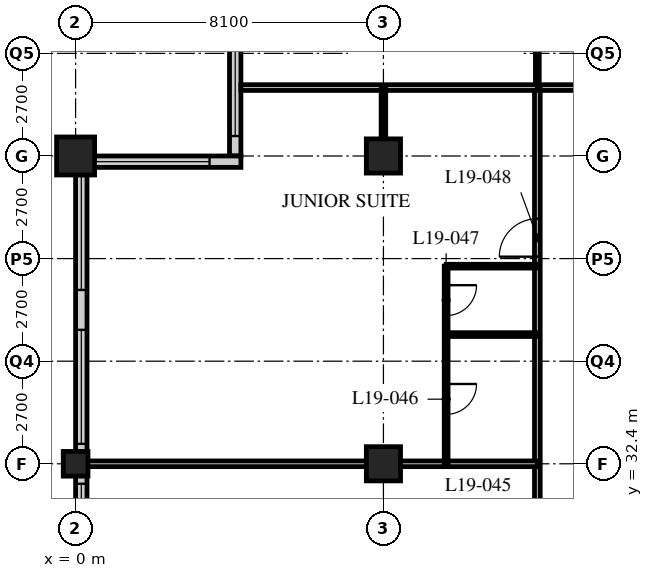
"""IFC4 building model, lengths in metres.
Left out: names, types, materials, properties, quantities, classifications, styles, units other than length and angle.
Written with IfcOpenShell. Run it as: python <this file> out.ifc"""

import sys

from ifc_helpers import new_model, si_unit, direction, frame, frame_2d, origin, origin_2d, place, context, subcontext, project, spatial, rectangle, hollow_rectangle, extrude, element, fill, save


model = new_model("IFC4")
c1 = context("Model", 3, precision=1e-05, world=origin(), true_north=direction((0.0, 1.0)))
c2 = subcontext(c1, "Body", "Model", "MODEL_VIEW")
j1 = project(units=[si_unit("LENGTHUNIT", "METRE"), si_unit("PLANEANGLEUNIT", "RADIAN")], contexts=[c1])
p1 = place(None, origin())
s1 = spatial("IfcSite", under=j1, at=p1, CompositionType="ELEMENT")
p2 = place(p1, origin())
s2 = spatial("IfcBuilding", under=s1, at=p2, CompositionType="ELEMENT")
p3 = place(p2, frame((0.0, 0.0, 77.2)))
s3 = spatial("IfcBuildingStorey", under=s2, at=p3, CompositionType="ELEMENT", Elevation=77.2)
p4 = place(p3, frame((0.0, 32.4, 0.0), z_axis=(0.0, 0.0, 1.0), x_axis=(1.0, 0.0, 0.0)))
e1 = element("IfcColumn", 1, at=p4, inside=s3, PredefinedType="COLUMN", context=c2, shape_type="SweptSolid", body=[
    extrude(hollow_rectangle(XDim=0.65, YDim=0.65, WallThickness=0.05, at=origin_2d()), origin(), (0.0, 0.0, 1.0), 3.4),
])
p5 = place(p3, frame((0.0, 40.5, 0.0), z_axis=(0.0, 0.0, 1.0), x_axis=(1.0, 0.0, 0.0)))
e2 = element("IfcColumn", 2, at=p5, inside=s3, PredefinedType="COLUMN", context=c2, shape_type="SweptSolid", body=[
    extrude(hollow_rectangle(XDim=1.0, YDim=1.0, WallThickness=0.1, at=origin_2d()), origin(), (0.0, 0.0, 1.0), 3.4),
])
for number, where, z_axis, x_axis in (
    (3, (8.1, 32.4, 0.0), (0.0, 0.0, 1.0), (1.0, 0.0, 0.0)),
    (4, (8.1, 40.5, 0.0), (0.0, 0.0, 1.0), (1.0, 0.0, 0.0)),
):
    element("IfcColumn", number, at=place(p3, frame(where, z_axis=z_axis, x_axis=x_axis)), inside=s3, PredefinedType="COLUMN", context=c2, shape_type="SweptSolid", body=[
        extrude(hollow_rectangle(XDim=0.9, YDim=0.9, WallThickness=0.09, at=origin_2d()), origin(), (0.0, 0.0, 1.0), 3.4),
    ])
p6 = place(p3, frame((4.2, 44.25, 0.0), z_axis=(0.0, 0.0, 1.0), x_axis=(0.0, -1.0, 0.0)))
e5 = element("IfcWall", 5, at=p6, inside=s3, PredefinedType="SOLIDWALL", context=c2, shape_type="SweptSolid", body=[
    extrude(rectangle(XDim=3.75, YDim=0.3, at=frame_2d((1.875, 0.0))), origin(), (0.0, 0.0, 1.0), 3.19),
])
p7 = place(p6, frame((0.225, 0.0, 0.9)))
e6 = element("IfcOpeningElement", 6, at=p7, cuts=e5, PredefinedType="OPENING", context=c2, shape_type="SweptSolid", body=[
    extrude(rectangle(XDim=3.0, YDim=1.5, at=frame_2d((1.5, 0.75))), frame((0.0, 0.16, 0.0), z_axis=(0.0, -1.0, 0.0), x_axis=(1.0, 0.0, 0.0)), (0.0, 0.0, 1.0), 0.32),
])
p8 = place(p3, frame((4.35, 40.35, 0.0), z_axis=(0.0, 0.0, 1.0), x_axis=(-1.0, 0.0, 0.0)))
e7 = element("IfcWall", 7, at=p8, inside=s3, PredefinedType="SOLIDWALL", context=c2, shape_type="SweptSolid", body=[
    extrude(rectangle(XDim=4.35, YDim=0.3, at=frame_2d((2.175, 0.0))), origin(), (0.0, 0.0, 1.0), 3.19),
])
p9 = place(p8, frame((0.825, 0.0, 0.9)))
e8 = element("IfcOpeningElement", 8, at=p9, cuts=e7, PredefinedType="OPENING", context=c2, shape_type="SweptSolid", body=[
    extrude(rectangle(XDim=3.0, YDim=1.5, at=frame_2d((1.5, 0.75))), frame((0.0, 0.16, 0.0), z_axis=(0.0, -1.0, 0.0), x_axis=(1.0, 0.0, 0.0)), (0.0, 0.0, 1.0), 0.32),
])
p10 = place(p3, frame((0.15, 40.2, 0.0), z_axis=(0.0, 0.0, 1.0), x_axis=(0.0, -1.0, 0.0)))
e9 = element("IfcWall", 9, at=p10, inside=s3, PredefinedType="SOLIDWALL", context=c2, shape_type="SweptSolid", body=[
    extrude(rectangle(XDim=32.1, YDim=0.3, at=frame_2d((16.05, 0.0))), origin(), (0.0, 0.0, 1.0), 3.19),
])
p11 = place(p10, frame((0.225, 0.0, 0.9)))
e10 = element("IfcOpeningElement", 10, at=p11, cuts=e9, PredefinedType="OPENING", context=c2, shape_type="SweptSolid", body=[
    extrude(rectangle(XDim=3.0, YDim=1.5, at=frame_2d((1.5, 0.75))), frame((0.0, 0.16, 0.0), z_axis=(0.0, -1.0, 0.0), x_axis=(1.0, 0.0, 0.0)), (0.0, 0.0, 1.0), 0.32),
])
p12 = place(p10, frame((4.275, 0.0, 0.9)))
e11 = element("IfcOpeningElement", 11, at=p12, cuts=e9, PredefinedType="OPENING", context=c2, shape_type="SweptSolid", body=[
    extrude(rectangle(XDim=3.0, YDim=1.5, at=frame_2d((1.5, 0.75))), frame((0.0, 0.16, 0.0), z_axis=(0.0, -1.0, 0.0), x_axis=(1.0, 0.0, 0.0)), (0.0, 0.0, 1.0), 0.32),
])
p13 = place(p10, frame((8.325, 0.0, 0.9)))
e12 = element("IfcOpeningElement", 12, at=p13, cuts=e9, PredefinedType="OPENING", context=c2, shape_type="SweptSolid", body=[
    extrude(rectangle(XDim=3.0, YDim=1.5, at=frame_2d((1.5, 0.75))), frame((0.0, 0.16, 0.0), z_axis=(0.0, -1.0, 0.0), x_axis=(1.0, 0.0, 0.0)), (0.0, 0.0, 1.0), 0.32),
])
p14 = place(p10, frame((12.375, 0.0, 0.9)))
e13 = element("IfcOpeningElement", 13, at=p14, cuts=e9, PredefinedType="OPENING", context=c2, shape_type="SweptSolid", body=[
    extrude(rectangle(XDim=3.0, YDim=1.5, at=frame_2d((1.5, 0.75))), frame((0.0, 0.16, 0.0), z_axis=(0.0, -1.0, 0.0), x_axis=(1.0, 0.0, 0.0)), (0.0, 0.0, 1.0), 0.32),
])
p15 = place(p10, frame((16.425, 0.0, 0.9)))
e14 = element("IfcOpeningElement", 14, at=p15, cuts=e9, PredefinedType="OPENING", context=c2, shape_type="SweptSolid", body=[
    extrude(rectangle(XDim=3.0, YDim=1.5, at=frame_2d((1.5, 0.75))), frame((0.0, 0.16, 0.0), z_axis=(0.0, -1.0, 0.0), x_axis=(1.0, 0.0, 0.0)), (0.0, 0.0, 1.0), 0.32),
])
p16 = place(p10, frame((20.475, 0.0, 0.9)))
e15 = element("IfcOpeningElement", 15, at=p16, cuts=e9, PredefinedType="OPENING", context=c2, shape_type="SweptSolid", body=[
    extrude(rectangle(XDim=3.0, YDim=1.5, at=frame_2d((1.5, 0.75))), frame((0.0, 0.16, 0.0), z_axis=(0.0, -1.0, 0.0), x_axis=(1.0, 0.0, 0.0)), (0.0, 0.0, 1.0), 0.32),
])
p17 = place(p10, frame((24.525, 0.0, 0.9)))
e16 = element("IfcOpeningElement", 16, at=p17, cuts=e9, PredefinedType="OPENING", context=c2, shape_type="SweptSolid", body=[
    extrude(rectangle(XDim=3.0, YDim=1.5, at=frame_2d((1.5, 0.75))), frame((0.0, 0.16, 0.0), z_axis=(0.0, -1.0, 0.0), x_axis=(1.0, 0.0, 0.0)), (0.0, 0.0, 1.0), 0.32),
])
p18 = place(p10, frame((28.575, 0.0, 0.9)))
e17 = element("IfcOpeningElement", 17, at=p18, cuts=e9, PredefinedType="OPENING", context=c2, shape_type="SweptSolid", body=[
    extrude(rectangle(XDim=3.0, YDim=1.5, at=frame_2d((1.5, 0.75))), frame((0.0, 0.16, 0.0), z_axis=(0.0, -1.0, 0.0), x_axis=(1.0, 0.0, 0.0)), (0.0, 0.0, 1.0), 0.32),
])
p19 = place(p3, frame((12.15, 42.3, 0.0), z_axis=(0.0, 0.0, 1.0), x_axis=(1.0, 0.0, 0.0)))
e18 = element("IfcWall", 18, at=p19, inside=s3, PredefinedType="PARTITIONING", context=c2, shape_type="SweptSolid", body=[
    extrude(rectangle(XDim=36.45, YDim=0.15, at=frame_2d((18.225, 0.0))), origin(), (0.0, 0.0, 1.0), 3.19),
])
p20 = place(p19, frame((9.5, 0.0, 0.0)))
e19 = element("IfcOpeningElement", 19, at=p20, cuts=e18, PredefinedType="OPENING", context=c2, shape_type="SweptSolid", body=[
    extrude(rectangle(XDim=1.0, YDim=2.1, at=frame_2d((0.5, 1.05))), frame((0.0, 0.085, 0.0), z_axis=(0.0, -1.0, 0.0), x_axis=(1.0, 0.0, 0.0)), (0.0, 0.0, 1.0), 0.17),
])
p21 = place(p19, frame((17.6, 0.0, 0.0)))
e20 = element("IfcOpeningElement", 20, at=p21, cuts=e18, PredefinedType="OPENING", context=c2, shape_type="SweptSolid", body=[
    extrude(rectangle(XDim=1.0, YDim=2.1, at=frame_2d((0.5, 1.05))), frame((0.0, 0.085, 0.0), z_axis=(0.0, -1.0, 0.0), x_axis=(1.0, 0.0, 0.0)), (0.0, 0.0, 1.0), 0.17),
])
p22 = place(p19, frame((22.7, 0.0, 0.0)))
e21 = element("IfcOpeningElement", 21, at=p22, cuts=e18, PredefinedType="OPENING", context=c2, shape_type="SweptSolid", body=[
    extrude(rectangle(XDim=1.0, YDim=2.1, at=frame_2d((0.5, 1.05))), frame((0.0, 0.085, 0.0), z_axis=(0.0, -1.0, 0.0), x_axis=(1.0, 0.0, 0.0)), (0.0, 0.0, 1.0), 0.17),
])
p23 = place(p19, frame((26.75, 0.0, 0.0)))
e22 = element("IfcOpeningElement", 22, at=p23, cuts=e18, PredefinedType="OPENING", context=c2, shape_type="SweptSolid", body=[
    extrude(rectangle(XDim=1.0, YDim=2.1, at=frame_2d((0.5, 1.05))), frame((0.0, 0.085, 0.0), z_axis=(0.0, -1.0, 0.0), x_axis=(1.0, 0.0, 0.0)), (0.0, 0.0, 1.0), 0.17),
])
p24 = place(p19, frame((30.8, 0.0, 0.0)))
e23 = element("IfcOpeningElement", 23, at=p24, cuts=e18, PredefinedType="OPENING", context=c2, shape_type="SweptSolid", body=[
    extrude(rectangle(XDim=1.0, YDim=2.1, at=frame_2d((0.5, 1.05))), frame((0.0, 0.085, 0.0), z_axis=(0.0, -1.0, 0.0), x_axis=(1.0, 0.0, 0.0)), (0.0, 0.0, 1.0), 0.17),
])
p25 = place(p19, frame((32.825, 0.0, 0.0)))
e24 = element("IfcOpeningElement", 24, at=p25, cuts=e18, PredefinedType="OPENING", context=c2, shape_type="SweptSolid", body=[
    extrude(rectangle(XDim=1.0, YDim=2.1, at=frame_2d((0.5, 1.05))), frame((0.0, 0.085, 0.0), z_axis=(0.0, -1.0, 0.0), x_axis=(1.0, 0.0, 0.0)), (0.0, 0.0, 1.0), 0.17),
])
p26 = place(p19, frame((2.625, 0.0, 0.0)))
e25 = element("IfcOpeningElement", 25, at=p26, cuts=e18, PredefinedType="OPENING", context=c2, shape_type="SweptSolid", body=[
    extrude(rectangle(XDim=1.0, YDim=2.1, at=frame_2d((0.5, 1.05))), frame((0.0, 0.085, 0.0), z_axis=(0.0, -1.0, 0.0), x_axis=(1.0, 0.0, 0.0)), (0.0, 0.0, 1.0), 0.17),
])
p27 = place(p3, frame((12.15, 16.2, 0.0), z_axis=(0.0, 0.0, 1.0), x_axis=(0.0, 1.0, 0.0)))
e26 = element("IfcWall", 26, at=p27, inside=s3, PredefinedType="PARTITIONING", context=c2, shape_type="SweptSolid", body=[
    extrude(rectangle(XDim=26.1, YDim=0.15, at=frame_2d((13.05, 0.0))), origin(), (0.0, 0.0, 1.0), 3.19),
])
p28 = place(p27, frame((0.3, 0.0, 0.0)))
e27 = element("IfcOpeningElement", 27, at=p28, cuts=e26, PredefinedType="OPENING", context=c2, shape_type="SweptSolid", body=[
    extrude(rectangle(XDim=1.0, YDim=2.1, at=frame_2d((0.5, 1.05))), frame((0.0, 0.085, 0.0), z_axis=(0.0, -1.0, 0.0), x_axis=(1.0, 0.0, 0.0)), (0.0, 0.0, 1.0), 0.17),
])
p29 = place(p27, frame((6.5, 0.0, 0.0)))
e28 = element("IfcOpeningElement", 28, at=p29, cuts=e26, PredefinedType="OPENING", context=c2, shape_type="SweptSolid", body=[
    extrude(rectangle(XDim=1.0, YDim=2.1, at=frame_2d((0.5, 1.05))), frame((0.0, 0.085, 0.0), z_axis=(0.0, -1.0, 0.0), x_axis=(1.0, 0.0, 0.0)), (0.0, 0.0, 1.0), 0.17),
])
p30 = place(p27, frame((13.55, 0.0, 0.0)))
e29 = element("IfcOpeningElement", 29, at=p30, cuts=e26, PredefinedType="OPENING", context=c2, shape_type="SweptSolid", body=[
    extrude(rectangle(XDim=1.0, YDim=2.1, at=frame_2d((0.5, 1.05))), frame((0.0, 0.085, 0.0), z_axis=(0.0, -1.0, 0.0), x_axis=(1.0, 0.0, 0.0)), (0.0, 0.0, 1.0), 0.17),
])
p31 = place(p27, frame((21.65, 0.0, 0.0)))
e30 = element("IfcOpeningElement", 30, at=p31, cuts=e26, PredefinedType="OPENING", context=c2, shape_type="SweptSolid", body=[
    extrude(rectangle(XDim=1.0, YDim=2.1, at=frame_2d((0.5, 1.05))), frame((0.0, 0.085, 0.0), z_axis=(0.0, -1.0, 0.0), x_axis=(1.0, 0.0, 0.0)), (0.0, 0.0, 1.0), 0.17),
])
p32 = place(p3, frame((12.15, 32.4, 0.0), z_axis=(0.0, 0.0, 1.0), x_axis=(-1.0, 0.0, 0.0)))
e31 = element("IfcWall", 31, at=p32, inside=s3, PredefinedType="PARTITIONING", context=c2, shape_type="SweptSolid", body=[
    extrude(rectangle(XDim=11.85, YDim=0.15, at=frame_2d((5.925, 0.0))), origin(), (0.0, 0.0, 1.0), 2.428),
])
p33 = place(p3, frame((9.75, 32.4, 0.0), z_axis=(0.0, 0.0, 1.0), x_axis=(0.0, 1.0, 0.0)))
e32 = element("IfcWall", 32, at=p33, inside=s3, PredefinedType="PARTITIONING", context=c2, shape_type="SweptSolid", body=[
    extrude(rectangle(XDim=5.2, YDim=0.1, at=frame_2d((2.6, 0.0))), origin(), (0.0, 0.0, 1.0), 3.19),
])
p34 = place(p33, frame((1.3, 0.0, 0.0)))
e33 = element("IfcOpeningElement", 33, at=p34, cuts=e32, PredefinedType="OPENING", context=c2, shape_type="SweptSolid", body=[
    extrude(rectangle(XDim=0.8, YDim=2.1, at=frame_2d((0.4, 1.05))), frame((0.0, 0.06, 0.0), z_axis=(0.0, -1.0, 0.0), x_axis=(1.0, 0.0, 0.0)), (0.0, 0.0, 1.0), 0.12),
])
p35 = place(p33, frame((3.9, 0.0, 0.0)))
e34 = element("IfcOpeningElement", 34, at=p35, cuts=e32, PredefinedType="OPENING", context=c2, shape_type="SweptSolid", body=[
    extrude(rectangle(XDim=0.8, YDim=2.1, at=frame_2d((0.4, 1.05))), frame((0.0, 0.06, 0.0), z_axis=(0.0, -1.0, 0.0), x_axis=(1.0, 0.0, 0.0)), (0.0, 0.0, 1.0), 0.12),
])
for number, where, z_axis, x_axis in (
    (35, (12.15, 35.8, 0.0), (0.0, 0.0, 1.0), (-1.0, 0.0, 0.0)),
    (36, (12.15, 37.6, 0.0), (0.0, 0.0, 1.0), (-1.0, 0.0, 0.0)),
    (37, (12.15, 42.3, 0.0), (0.0, 0.0, 1.0), (0.0, 1.0, 0.0)),
):
    element("IfcWall", number, at=place(p3, frame(where, z_axis=z_axis, x_axis=x_axis)), inside=s3, PredefinedType="PARTITIONING", context=c2, shape_type="SweptSolid", body=[
        extrude(rectangle(XDim=2.4, YDim=0.1, at=frame_2d((1.2, 0.0))), origin(), (0.0, 0.0, 1.0), 3.19),
    ])
p36 = place(p3, frame((4.35, 42.3, 0.0), z_axis=(0.0, 0.0, 1.0), x_axis=(1.0, 0.0, 0.0)))
e38 = element("IfcWall", 38, at=p36, inside=s3, PredefinedType="PARTITIONING", context=c2, shape_type="SweptSolid", body=[
    extrude(rectangle(XDim=7.8, YDim=0.15, at=frame_2d((3.9, 0.0))), origin(), (0.0, 0.0, 1.0), 3.19),
])
p37 = place(p3, frame((8.1, 42.3, 0.0), z_axis=(0.0, 0.0, 1.0), x_axis=(0.0, -1.0, 0.0)))
e39 = element("IfcWall", 39, at=p37, inside=s3, PredefinedType="PARTITIONING", context=c2, shape_type="SweptSolid", body=[
    extrude(rectangle(XDim=1.35, YDim=0.12, at=frame_2d((0.675, 0.0))), origin(), (0.0, 0.0, 1.0), 2.428),
])
p38 = place(p7, origin())
e40 = element("IfcWindow", 40, at=p38, inside=s3, PartitioningType="SINGLE_PANEL", PredefinedType="WINDOW", context=c2, shape_type="SweptSolid", body=[
    extrude(rectangle(XDim=3.0, YDim=1.5, at=frame_2d((1.5, 0.75))), frame((0.0, 0.03, 0.0), z_axis=(0.0, -1.0, 0.0), x_axis=(1.0, 0.0, 0.0)), (0.0, 0.0, 1.0), 0.06),
])
fill(e6, e40)
p39 = place(p9, origin())
e41 = element("IfcWindow", 41, at=p39, inside=s3, PartitioningType="SINGLE_PANEL", PredefinedType="WINDOW", context=c2, shape_type="SweptSolid", body=[
    extrude(rectangle(XDim=3.0, YDim=1.5, at=frame_2d((1.5, 0.75))), frame((0.0, 0.03, 0.0), z_axis=(0.0, -1.0, 0.0), x_axis=(1.0, 0.0, 0.0)), (0.0, 0.0, 1.0), 0.06),
])
fill(e8, e41)
p40 = place(p11, origin())
e42 = element("IfcWindow", 42, at=p40, inside=s3, PartitioningType="SINGLE_PANEL", PredefinedType="WINDOW", context=c2, shape_type="SweptSolid", body=[
    extrude(rectangle(XDim=3.0, YDim=1.5, at=frame_2d((1.5, 0.75))), frame((0.0, 0.03, 0.0), z_axis=(0.0, -1.0, 0.0), x_axis=(1.0, 0.0, 0.0)), (0.0, 0.0, 1.0), 0.06),
])
fill(e10, e42)
p41 = place(p12, origin())
e43 = element("IfcWindow", 43, at=p41, inside=s3, PartitioningType="SINGLE_PANEL", PredefinedType="WINDOW", context=c2, shape_type="SweptSolid", body=[
    extrude(rectangle(XDim=3.0, YDim=1.5, at=frame_2d((1.5, 0.75))), frame((0.0, 0.03, 0.0), z_axis=(0.0, -1.0, 0.0), x_axis=(1.0, 0.0, 0.0)), (0.0, 0.0, 1.0), 0.06),
])
fill(e11, e43)
p42 = place(p13, origin())
e44 = element("IfcWindow", 44, at=p42, inside=s3, PartitioningType="SINGLE_PANEL", PredefinedType="WINDOW", context=c2, shape_type="SweptSolid", body=[
    extrude(rectangle(XDim=3.0, YDim=1.5, at=frame_2d((1.5, 0.75))), frame((0.0, 0.03, 0.0), z_axis=(0.0, -1.0, 0.0), x_axis=(1.0, 0.0, 0.0)), (0.0, 0.0, 1.0), 0.06),
])
fill(e12, e44)
p43 = place(p34, origin())
e45 = element("IfcDoor", 45, at=p43, inside=s3, OperationType="SINGLE_SWING_LEFT", PredefinedType="DOOR", context=c2, shape_type="SweptSolid", body=[
    extrude(rectangle(XDim=0.8, YDim=2.1, at=frame_2d((0.4, 1.05))), frame((0.0, 0.025, 0.0), z_axis=(0.0, -1.0, 0.0), x_axis=(1.0, 0.0, 0.0)), (0.0, 0.0, 1.0), 0.05),
])
fill(e33, e45)
p44 = place(p35, origin())
e46 = element("IfcDoor", 46, at=p44, inside=s3, OperationType="SINGLE_SWING_LEFT", PredefinedType="DOOR", context=c2, shape_type="SweptSolid", body=[
    extrude(rectangle(XDim=0.8, YDim=2.1, at=frame_2d((0.4, 1.05))), frame((0.0, 0.025, 0.0), z_axis=(0.0, -1.0, 0.0), x_axis=(1.0, 0.0, 0.0)), (0.0, 0.0, 1.0), 0.05),
])
fill(e34, e46)
p45 = place(p31, origin())
e47 = element("IfcDoor", 47, at=p45, inside=s3, OperationType="SINGLE_SWING_LEFT", PredefinedType="DOOR", context=c2, shape_type="SweptSolid", body=[
    extrude(rectangle(XDim=1.0, YDim=2.1, at=frame_2d((0.5, 1.05))), frame((0.0, 0.025, 0.0), z_axis=(0.0, -1.0, 0.0), x_axis=(1.0, 0.0, 0.0)), (0.0, 0.0, 1.0), 0.05),
])
fill(e30, e47)
save(model, sys.argv[1])
